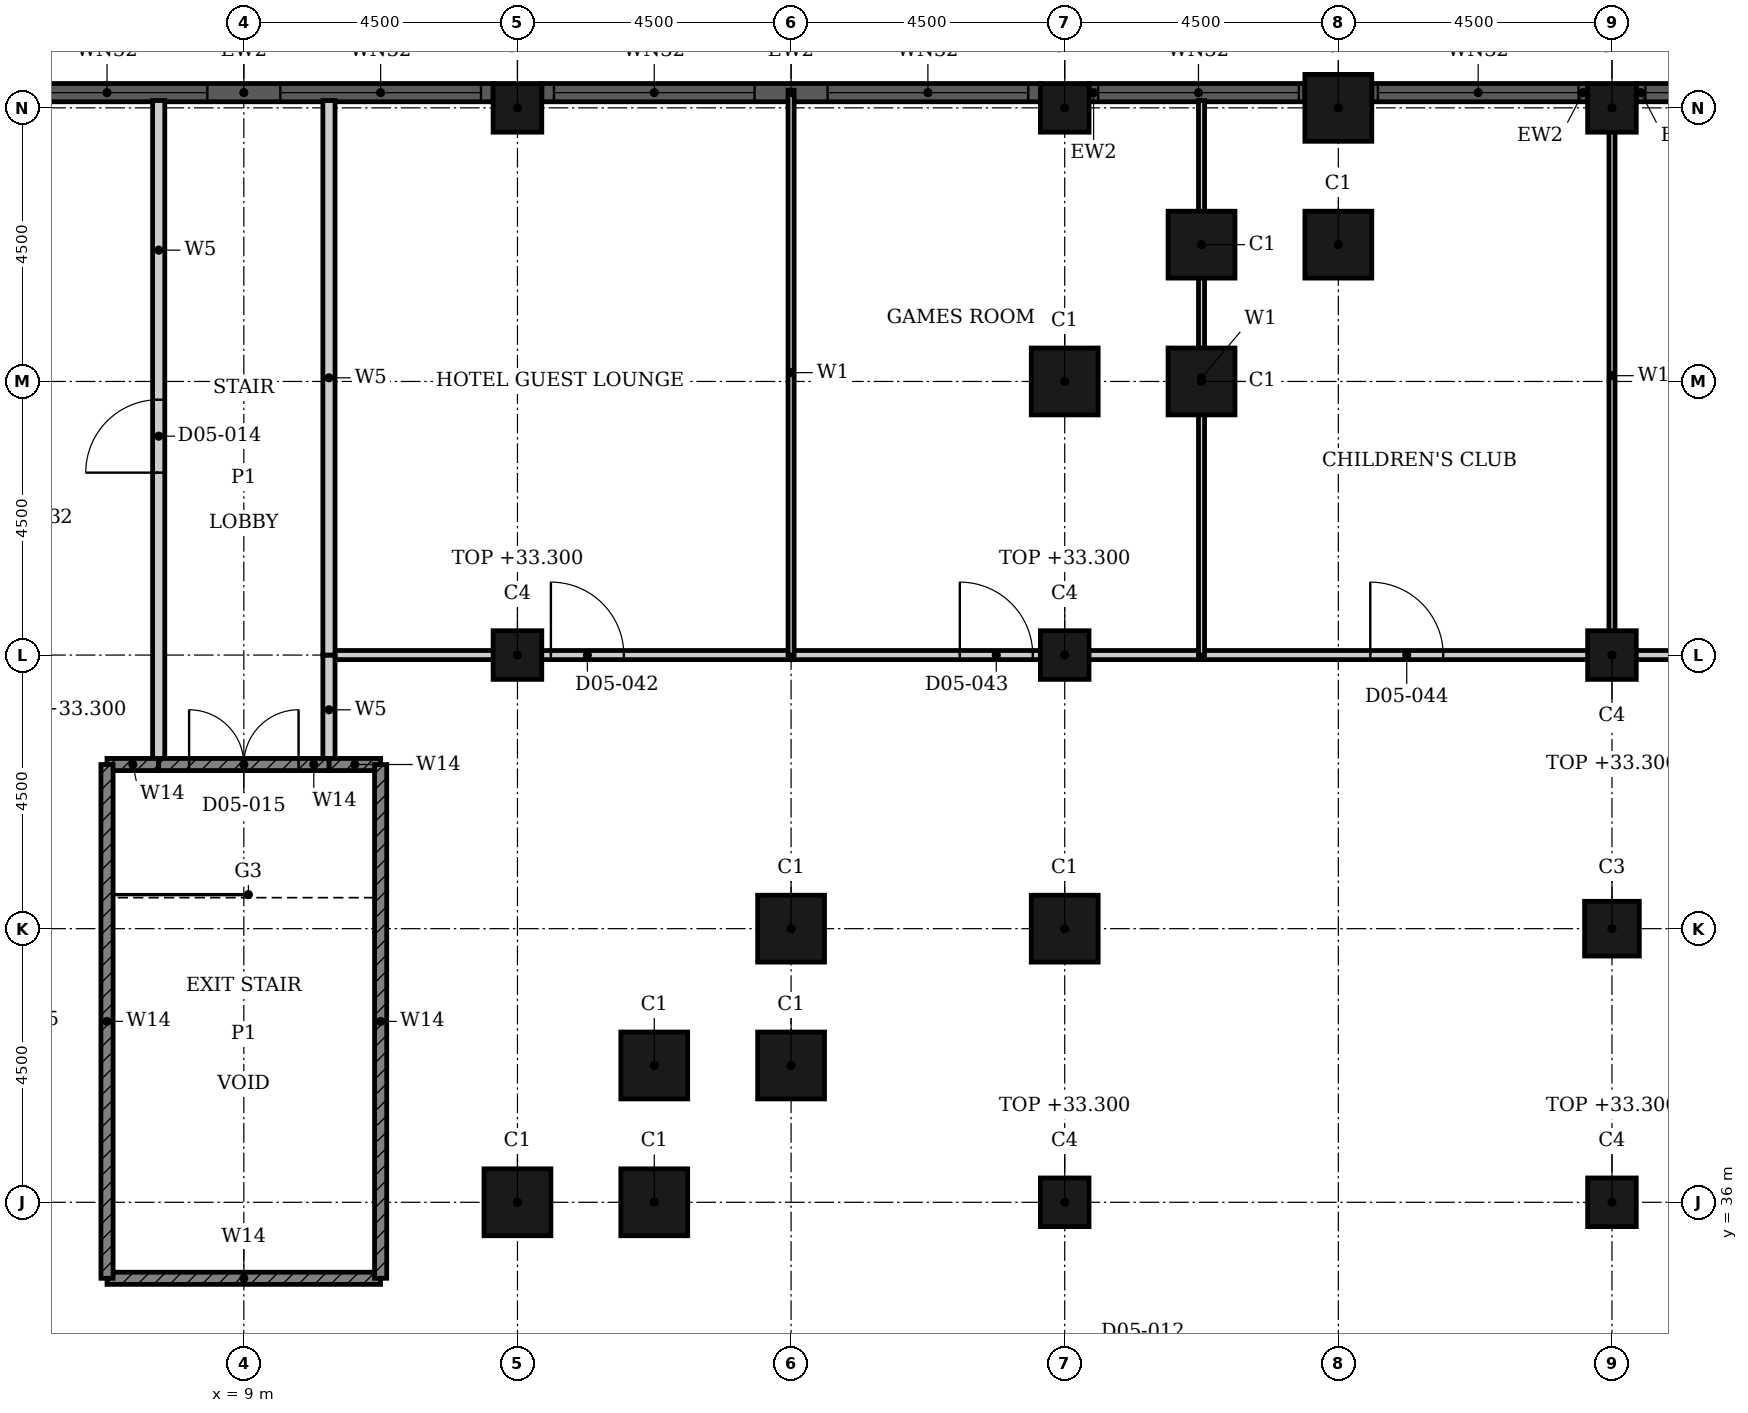
"""IFC4 building model, lengths in metres.
Left out: names, types, materials, properties, quantities, classifications, styles, units other than length and angle.
Written with IfcOpenShell. Run it as: python <this file> out.ifc"""

import sys

from ifc_helpers import new_model, si_unit, direction, frame, frame_2d, origin, origin_2d, place, context, subcontext, project, spatial, rectangle, hollow_rectangle, extrude, element, fill, save


model = new_model("IFC4")
c1 = context("Model", 3, precision=1e-05, world=origin(), true_north=direction((0.0, 1.0)))
c2 = subcontext(c1, "Body", "Model", "MODEL_VIEW")
j1 = project(units=[si_unit("LENGTHUNIT", "METRE"), si_unit("PLANEANGLEUNIT", "RADIAN")], contexts=[c1])
p1 = place(None, origin())
s1 = spatial("IfcSite", under=j1, at=p1, CompositionType="ELEMENT")
p2 = place(p1, origin())
s2 = spatial("IfcBuilding", under=s1, at=p2, CompositionType="ELEMENT")
p3 = place(p2, frame((0.0, 0.0, 28.8)))
s3 = spatial("IfcBuildingStorey", under=s2, at=p3, CompositionType="ELEMENT", Elevation=28.8)
for number, where, z_axis, x_axis in (
    (1, (27.0, 54.0, 0.0), (0.0, 0.0, 1.0), (1.0, 0.0, 0.0)),
    (2, (27.0, 51.75, 0.0), (0.0, 0.0, 1.0), (1.0, 0.0, 0.0)),
    (3, (24.75, 51.75, 0.0), (0.0, 0.0, 1.0), (1.0, 0.0, 0.0)),
    (4, (24.75, 49.5, 0.0), (0.0, 0.0, 1.0), (1.0, 0.0, 0.0)),
    (5, (22.5, 49.5, 0.0), (0.0, 0.0, 1.0), (1.0, 0.0, 0.0)),
    (6, (22.5, 40.5, 0.0), (0.0, 0.0, 1.0), (1.0, 0.0, 0.0)),
    (7, (18.0, 40.5, 0.0), (0.0, 0.0, 1.0), (1.0, 0.0, 0.0)),
    (8, (18.0, 38.25, 0.0), (0.0, 0.0, 1.0), (1.0, 0.0, 0.0)),
    (9, (15.75, 38.25, 0.0), (0.0, 0.0, 1.0), (1.0, 0.0, 0.0)),
    (10, (15.75, 36.0, 0.0), (0.0, 0.0, 1.0), (1.0, 0.0, 0.0)),
    (11, (13.5, 36.0, 0.0), (0.0, 0.0, 1.0), (1.0, 0.0, 0.0)),
):
    element("IfcColumn", number, at=place(p3, frame(where, z_axis=z_axis, x_axis=x_axis)), inside=s3, PredefinedType="COLUMN", context=c2, shape_type="SweptSolid", body=[
        extrude(hollow_rectangle(XDim=1.1, YDim=1.1, WallThickness=0.036, at=origin_2d()), origin(), (0.0, 0.0, 1.0), 4.8),
    ])
p4 = place(p3, frame((31.5, 40.5, 0.0), z_axis=(0.0, 0.0, 1.0), x_axis=(1.0, 0.0, 0.0)))
e12 = element("IfcColumn", 12, at=p4, inside=s3, PredefinedType="COLUMN", context=c2, shape_type="SweptSolid", body=[
    extrude(hollow_rectangle(XDim=0.9, YDim=0.9, WallThickness=0.028, at=origin_2d()), origin(), (0.0, 0.0, 1.0), 4.8),
])
for number, where, z_axis, x_axis in (
    (13, (13.5, 54.0, 0.0), (0.0, 0.0, 1.0), (1.0, 0.0, 0.0)),
    (14, (22.5, 54.0, 0.0), (0.0, 0.0, 1.0), (1.0, 0.0, 0.0)),
    (15, (31.5, 54.0, 0.0), (0.0, 0.0, 1.0), (1.0, 0.0, 0.0)),
    (16, (13.5, 45.0, 0.0), (0.0, 0.0, 1.0), (1.0, 0.0, 0.0)),
    (17, (22.5, 36.0, 0.0), (0.0, 0.0, 1.0), (1.0, 0.0, 0.0)),
    (18, (22.5, 45.0, 0.0), (0.0, 0.0, 1.0), (1.0, 0.0, 0.0)),
    (19, (31.5, 36.0, 0.0), (0.0, 0.0, 1.0), (1.0, 0.0, 0.0)),
    (20, (31.5, 45.0, 0.0), (0.0, 0.0, 1.0), (1.0, 0.0, 0.0)),
):
    element("IfcColumn", number, at=place(p3, frame(where, z_axis=z_axis, x_axis=x_axis)), inside=s3, PredefinedType="COLUMN", context=c2, shape_type="SweptSolid", body=[
        extrude(hollow_rectangle(XDim=0.8, YDim=0.8, WallThickness=0.025, at=origin_2d()), origin(), (0.0, 0.0, 1.0), 4.5),
    ])
p5 = place(p3, frame((35.45, 54.25, 0.0), z_axis=(0.0, 0.0, 1.0), x_axis=(-1.0, 0.0, 0.0)))
e21 = element("IfcWall", 21, at=p5, inside=s3, PredefinedType="SOLIDWALL", context=c2, shape_type="SweptSolid", body=[
    extrude(rectangle(XDim=3.55, YDim=0.3, at=frame_2d((1.775, 0.0))), origin(), (0.0, 0.0, 1.0), 4.8),
])
p6 = place(p5, frame((0.1, 0.0, 0.9)))
e22 = element("IfcOpeningElement", 22, at=p6, cuts=e21, PredefinedType="OPENING", context=c2, shape_type="SweptSolid", body=[
    extrude(rectangle(XDim=3.3, YDim=2.9, at=frame_2d((1.65, 1.45))), frame((0.0, 0.16, 0.0), z_axis=(0.0, -1.0, 0.0), x_axis=(1.0, 0.0, 0.0)), (0.0, 0.0, 1.0), 0.32),
])
p7 = place(p3, frame((31.1, 54.25, 0.0), z_axis=(0.0, 0.0, 1.0), x_axis=(-1.0, 0.0, 0.0)))
e23 = element("IfcWall", 23, at=p7, inside=s3, PredefinedType="SOLIDWALL", context=c2, shape_type="SweptSolid", body=[
    extrude(rectangle(XDim=3.55, YDim=0.3, at=frame_2d((1.775, 0.0))), origin(), (0.0, 0.0, 1.0), 4.8),
])
p8 = place(p7, frame((0.15, 0.0, 0.9)))
e24 = element("IfcOpeningElement", 24, at=p8, cuts=e23, PredefinedType="OPENING", context=c2, shape_type="SweptSolid", body=[
    extrude(rectangle(XDim=3.3, YDim=2.9, at=frame_2d((1.65, 1.45))), frame((0.0, 0.16, 0.0), z_axis=(0.0, -1.0, 0.0), x_axis=(1.0, 0.0, 0.0)), (0.0, 0.0, 1.0), 0.32),
])
p9 = place(p3, frame((26.45, 54.25, 0.0), z_axis=(0.0, 0.0, 1.0), x_axis=(-1.0, 0.0, 0.0)))
e25 = element("IfcWall", 25, at=p9, inside=s3, PredefinedType="SOLIDWALL", context=c2, shape_type="SweptSolid", body=[
    extrude(rectangle(XDim=3.55, YDim=0.3, at=frame_2d((1.775, 0.0))), origin(), (0.0, 0.0, 1.0), 4.8),
])
p10 = place(p9, frame((0.1, 0.0, 0.9)))
e26 = element("IfcOpeningElement", 26, at=p10, cuts=e25, PredefinedType="OPENING", context=c2, shape_type="SweptSolid", body=[
    extrude(rectangle(XDim=3.3, YDim=2.9, at=frame_2d((1.65, 1.45))), frame((0.0, 0.16, 0.0), z_axis=(0.0, -1.0, 0.0), x_axis=(1.0, 0.0, 0.0)), (0.0, 0.0, 1.0), 0.32),
])
p11 = place(p3, frame((22.1, 54.25, 0.0), z_axis=(0.0, 0.0, 1.0), x_axis=(-1.0, 0.0, 0.0)))
e27 = element("IfcWall", 27, at=p11, inside=s3, PredefinedType="SOLIDWALL", context=c2, shape_type="SweptSolid", body=[
    extrude(rectangle(XDim=8.2, YDim=0.3, at=frame_2d((4.1, 0.0))), origin(), (0.0, 0.0, 1.0), 4.8),
])
p12 = place(p11, frame((0.2, 0.0, 0.9)))
e28 = element("IfcOpeningElement", 28, at=p12, cuts=e27, PredefinedType="OPENING", context=c2, shape_type="SweptSolid", body=[
    extrude(rectangle(XDim=3.3, YDim=2.9, at=frame_2d((1.65, 1.45))), frame((0.0, 0.16, 0.0), z_axis=(0.0, -1.0, 0.0), x_axis=(1.0, 0.0, 0.0)), (0.0, 0.0, 1.0), 0.32),
])
p13 = place(p11, frame((4.7, 0.0, 0.9)))
e29 = element("IfcOpeningElement", 29, at=p13, cuts=e27, PredefinedType="OPENING", context=c2, shape_type="SweptSolid", body=[
    extrude(rectangle(XDim=3.3, YDim=2.9, at=frame_2d((1.65, 1.45))), frame((0.0, 0.16, 0.0), z_axis=(0.0, -1.0, 0.0), x_axis=(1.0, 0.0, 0.0)), (0.0, 0.0, 1.0), 0.32),
])
p14 = place(p3, frame((13.1, 54.25, 0.0), z_axis=(0.0, 0.0, 1.0), x_axis=(-1.0, 0.0, 0.0)))
e30 = element("IfcWall", 30, at=p14, inside=s3, PredefinedType="SOLIDWALL", context=c2, shape_type="SweptSolid", body=[
    extrude(rectangle(XDim=8.2, YDim=0.3, at=frame_2d((4.1, 0.0))), origin(), (0.0, 0.0, 1.0), 4.8),
])
p15 = place(p14, frame((0.2, 0.0, 0.9)))
e31 = element("IfcOpeningElement", 31, at=p15, cuts=e30, PredefinedType="OPENING", context=c2, shape_type="SweptSolid", body=[
    extrude(rectangle(XDim=3.3, YDim=2.9, at=frame_2d((1.65, 1.45))), frame((0.0, 0.16, 0.0), z_axis=(0.0, -1.0, 0.0), x_axis=(1.0, 0.0, 0.0)), (0.0, 0.0, 1.0), 0.32),
])
p16 = place(p14, frame((4.7, 0.0, 0.9)))
e32 = element("IfcOpeningElement", 32, at=p16, cuts=e30, PredefinedType="OPENING", context=c2, shape_type="SweptSolid", body=[
    extrude(rectangle(XDim=3.3, YDim=2.9, at=frame_2d((1.65, 1.45))), frame((0.0, 0.16, 0.0), z_axis=(0.0, -1.0, 0.0), x_axis=(1.0, 0.0, 0.0)), (0.0, 0.0, 1.0), 0.32),
])
p17 = place(p3, frame((10.4, 45.0, 0.0), z_axis=(0.0, 0.0, 1.0), x_axis=(1.0, 0.0, 0.0)))
e33 = element("IfcWall", 33, at=p17, inside=s3, PredefinedType="PARTITIONING", context=c2, shape_type="SweptSolid", body=[
    extrude(rectangle(XDim=7.6, YDim=0.15, at=frame_2d((3.8, 0.0))), origin(), (0.0, 0.0, 1.0), 4.5),
])
p18 = place(p17, frame((3.65, 0.0, 0.0)))
e34 = element("IfcOpeningElement", 34, at=p18, cuts=e33, PredefinedType="OPENING", context=c2, shape_type="SweptSolid", body=[
    extrude(rectangle(XDim=1.2, YDim=2.4, at=frame_2d((0.6, 1.2))), frame((0.0, 0.085, 0.0), z_axis=(0.0, -1.0, 0.0), x_axis=(1.0, 0.0, 0.0)), (0.0, 0.0, 1.0), 0.17),
])
p19 = place(p3, frame((18.0, 45.0, 0.0), z_axis=(0.0, 0.0, 1.0), x_axis=(1.0, 0.0, 0.0)))
e35 = element("IfcWall", 35, at=p19, inside=s3, PredefinedType="PARTITIONING", context=c2, shape_type="SweptSolid", body=[
    extrude(rectangle(XDim=6.75, YDim=0.15, at=frame_2d((3.375, 0.0))), origin(), (0.0, 0.0, 1.0), 4.5),
])
p20 = place(p19, frame((2.775, 0.0, 0.0)))
e36 = element("IfcOpeningElement", 36, at=p20, cuts=e35, PredefinedType="OPENING", context=c2, shape_type="SweptSolid", body=[
    extrude(rectangle(XDim=1.2, YDim=2.4, at=frame_2d((0.6, 1.2))), frame((0.0, 0.085, 0.0), z_axis=(0.0, -1.0, 0.0), x_axis=(1.0, 0.0, 0.0)), (0.0, 0.0, 1.0), 0.17),
])
p21 = place(p3, frame((24.75, 45.0, 0.0), z_axis=(0.0, 0.0, 1.0), x_axis=(1.0, 0.0, 0.0)))
e37 = element("IfcWall", 37, at=p21, inside=s3, PredefinedType="PARTITIONING", context=c2, shape_type="SweptSolid", body=[
    extrude(rectangle(XDim=6.75, YDim=0.15, at=frame_2d((3.375, 0.0))), origin(), (0.0, 0.0, 1.0), 4.5),
])
p22 = place(p21, frame((2.775, 0.0, 0.0)))
e38 = element("IfcOpeningElement", 38, at=p22, cuts=e37, PredefinedType="OPENING", context=c2, shape_type="SweptSolid", body=[
    extrude(rectangle(XDim=1.2, YDim=2.4, at=frame_2d((0.6, 1.2))), frame((0.0, 0.085, 0.0), z_axis=(0.0, -1.0, 0.0), x_axis=(1.0, 0.0, 0.0)), (0.0, 0.0, 1.0), 0.17),
])
p23 = place(p3, frame((31.5, 45.0, 0.0), z_axis=(0.0, 0.0, 1.0), x_axis=(1.0, 0.0, 0.0)))
e39 = element("IfcWall", 39, at=p23, inside=s3, PredefinedType="PARTITIONING", context=c2, shape_type="SweptSolid", body=[
    extrude(rectangle(XDim=10.0, YDim=0.15, at=frame_2d((5.0, 0.0))), origin(), (0.0, 0.0, 1.0), 4.5),
])
p24 = place(p23, frame((4.55, 0.0, 0.0)))
e40 = element("IfcOpeningElement", 40, at=p24, cuts=e39, PredefinedType="OPENING", context=c2, shape_type="SweptSolid", body=[
    extrude(rectangle(XDim=0.9, YDim=2.1, at=frame_2d((0.45, 1.05))), frame((0.0, 0.085, 0.0), z_axis=(0.0, -1.0, 0.0), x_axis=(1.0, 0.0, 0.0)), (0.0, 0.0, 1.0), 0.17),
])
p25 = place(p3, frame((18.0, 45.0, 0.0), z_axis=(0.0, 0.0, 1.0), x_axis=(0.0, 1.0, 0.0)))
e41 = element("IfcWall", 41, at=p25, inside=s3, PredefinedType="PARTITIONING", context=c2, shape_type="SweptSolid", body=[
    extrude(rectangle(XDim=9.29, YDim=0.1, at=frame_2d((4.645, 0.0))), origin(), (0.0, 0.0, 1.0), 4.5),
])
p26 = place(p3, frame((24.75, 45.0, 0.0), z_axis=(0.0, 0.0, 1.0), x_axis=(0.0, 1.0, 0.0)))
e42 = element("IfcWall", 42, at=p26, inside=s3, PredefinedType="PARTITIONING", context=c2, shape_type="SweptSolid", body=[
    extrude(rectangle(XDim=9.12, YDim=0.1, at=frame_2d((4.56, 0.0))), origin(), (0.0, 0.0, 1.0), 3.88),
])
p27 = place(p3, frame((31.5, 45.0, 0.0), z_axis=(0.0, 0.0, 1.0), x_axis=(0.0, 1.0, 0.0)))
e43 = element("IfcWall", 43, at=p27, inside=s3, PredefinedType="PARTITIONING", context=c2, shape_type="SweptSolid", body=[
    extrude(rectangle(XDim=9.19, YDim=0.1, at=frame_2d((4.595, 0.0))), origin(), (0.0, 0.0, 1.0), 3.78),
])
p28 = place(p3, frame((10.4, 43.2, 0.0), z_axis=(0.0, 0.0, 1.0), x_axis=(0.0, 1.0, 0.0)))
e44 = element("IfcWall", 44, at=p28, inside=s3, PredefinedType="PARTITIONING", context=c2, shape_type="SweptSolid", body=[
    extrude(rectangle(XDim=1.8, YDim=0.2, at=frame_2d((0.9, 0.0))), origin(), (0.0, 0.0, 1.0), 4.5),
])
p29 = place(p3, frame((10.4, 45.0, 0.0), z_axis=(0.0, 0.0, 1.0), x_axis=(0.0, 1.0, 0.0)))
e45 = element("IfcWall", 45, at=p29, inside=s3, PredefinedType="PARTITIONING", context=c2, shape_type="SweptSolid", body=[
    extrude(rectangle(XDim=9.12, YDim=0.2, at=frame_2d((4.56, 0.0))), origin(), (0.0, 0.0, 1.0), 4.5),
])
p30 = place(p3, frame((7.6, 43.2, 0.0), z_axis=(0.0, 0.0, 1.0), x_axis=(0.0, 1.0, 0.0)))
e46 = element("IfcWall", 46, at=p30, inside=s3, PredefinedType="PARTITIONING", context=c2, shape_type="SweptSolid", body=[
    extrude(rectangle(XDim=10.92, YDim=0.2, at=frame_2d((5.46, 0.0))), origin(), (0.0, 0.0, 1.0), 4.5),
])
p31 = place(p30, frame((4.8, 0.0, 0.0)))
e47 = element("IfcOpeningElement", 47, at=p31, cuts=e46, PredefinedType="OPENING", context=c2, shape_type="SweptSolid", body=[
    extrude(rectangle(XDim=1.2, YDim=2.1, at=frame_2d((0.6, 1.05))), frame((0.0, 0.11, 0.0), z_axis=(0.0, -1.0, 0.0), x_axis=(1.0, 0.0, 0.0)), (0.0, 0.0, 1.0), 0.22),
])
p32 = place(p3, frame((6.75, 34.75, 0.0), z_axis=(0.0, 0.0, 1.0), x_axis=(1.0, 0.0, 0.0)))
e48 = element("IfcWall", 48, at=p32, inside=s3, PredefinedType="SHEAR", context=c2, shape_type="SweptSolid", body=[
    extrude(rectangle(XDim=4.5, YDim=0.2, at=frame_2d((2.25, 0.0))), origin(), (0.0, 0.0, 1.0), 4.5),
])
for number, where, z_axis, x_axis in (
    (49, (6.75, 43.2, 0.0), (0.0, 0.0, 1.0), (1.0, 0.0, 0.0)),
    (50, (10.4, 43.2, 0.0), (0.0, 0.0, 1.0), (1.0, 0.0, 0.0)),
):
    element("IfcWall", number, at=place(p3, frame(where, z_axis=z_axis, x_axis=x_axis)), inside=s3, PredefinedType="SHEAR", context=c2, shape_type="SweptSolid", body=[
        extrude(rectangle(XDim=0.85, YDim=0.2, at=frame_2d((0.425, 0.0))), origin(), (0.0, 0.0, 1.0), 4.5),
    ])
p33 = place(p3, frame((7.6, 43.2, 0.0), z_axis=(0.0, 0.0, 1.0), x_axis=(1.0, 0.0, 0.0)))
e51 = element("IfcWall", 51, at=p33, inside=s3, PredefinedType="SHEAR", context=c2, shape_type="SweptSolid", body=[
    extrude(rectangle(XDim=2.8, YDim=0.2, at=frame_2d((1.4, 0.0))), origin(), (0.0, 0.0, 1.0), 4.5),
])
p34 = place(p33, frame((0.5, 0.0, 0.0)))
e52 = element("IfcOpeningElement", 52, at=p34, cuts=e51, PredefinedType="OPENING", context=c2, shape_type="SweptSolid", body=[
    extrude(rectangle(XDim=1.8, YDim=2.1, at=frame_2d((0.9, 1.05))), frame((0.0, 0.11, 0.0), z_axis=(0.0, -1.0, 0.0), x_axis=(1.0, 0.0, 0.0)), (0.0, 0.0, 1.0), 0.22),
])
for number, where, z_axis, x_axis in (
    (53, (11.25, 34.75, 0.0), (0.0, 0.0, 1.0), (0.0, 1.0, 0.0)),
    (54, (6.75, 34.75, 0.0), (0.0, 0.0, 1.0), (0.0, 1.0, 0.0)),
):
    element("IfcWall", number, at=place(p3, frame(where, z_axis=z_axis, x_axis=x_axis)), inside=s3, PredefinedType="SHEAR", context=c2, shape_type="SweptSolid", body=[
        extrude(rectangle(XDim=8.45, YDim=0.2, at=frame_2d((4.225, 0.0))), origin(), (0.0, 0.0, 1.0), 4.5),
    ])
p35 = place(p6, origin())
e55 = element("IfcWindow", 55, at=p35, inside=s3, PartitioningType="SINGLE_PANEL", PredefinedType="WINDOW", context=c2, shape_type="SweptSolid", body=[
    extrude(rectangle(XDim=3.3, YDim=2.9, at=frame_2d((1.65, 1.45))), frame((0.0, 0.03, 0.0), z_axis=(0.0, -1.0, 0.0), x_axis=(1.0, 0.0, 0.0)), (0.0, 0.0, 1.0), 0.06),
])
fill(e22, e55)
p36 = place(p8, origin())
e56 = element("IfcWindow", 56, at=p36, inside=s3, PartitioningType="SINGLE_PANEL", PredefinedType="WINDOW", context=c2, shape_type="SweptSolid", body=[
    extrude(rectangle(XDim=3.3, YDim=2.9, at=frame_2d((1.65, 1.45))), frame((0.0, 0.03, 0.0), z_axis=(0.0, -1.0, 0.0), x_axis=(1.0, 0.0, 0.0)), (0.0, 0.0, 1.0), 0.06),
])
fill(e24, e56)
p37 = place(p10, origin())
e57 = element("IfcWindow", 57, at=p37, inside=s3, PartitioningType="SINGLE_PANEL", PredefinedType="WINDOW", context=c2, shape_type="SweptSolid", body=[
    extrude(rectangle(XDim=3.3, YDim=2.9, at=frame_2d((1.65, 1.45))), frame((0.0, 0.03, 0.0), z_axis=(0.0, -1.0, 0.0), x_axis=(1.0, 0.0, 0.0)), (0.0, 0.0, 1.0), 0.06),
])
fill(e26, e57)
p38 = place(p12, origin())
e58 = element("IfcWindow", 58, at=p38, inside=s3, PartitioningType="SINGLE_PANEL", PredefinedType="WINDOW", context=c2, shape_type="SweptSolid", body=[
    extrude(rectangle(XDim=3.3, YDim=2.9, at=frame_2d((1.65, 1.45))), frame((0.0, 0.03, 0.0), z_axis=(0.0, -1.0, 0.0), x_axis=(1.0, 0.0, 0.0)), (0.0, 0.0, 1.0), 0.06),
])
fill(e28, e58)
p39 = place(p13, origin())
e59 = element("IfcWindow", 59, at=p39, inside=s3, PartitioningType="SINGLE_PANEL", PredefinedType="WINDOW", context=c2, shape_type="SweptSolid", body=[
    extrude(rectangle(XDim=3.3, YDim=2.9, at=frame_2d((1.65, 1.45))), frame((0.0, 0.03, 0.0), z_axis=(0.0, -1.0, 0.0), x_axis=(1.0, 0.0, 0.0)), (0.0, 0.0, 1.0), 0.06),
])
fill(e29, e59)
p40 = place(p15, origin())
e60 = element("IfcWindow", 60, at=p40, inside=s3, PartitioningType="SINGLE_PANEL", PredefinedType="WINDOW", context=c2, shape_type="SweptSolid", body=[
    extrude(rectangle(XDim=3.3, YDim=2.9, at=frame_2d((1.65, 1.45))), frame((0.0, 0.03, 0.0), z_axis=(0.0, -1.0, 0.0), x_axis=(1.0, 0.0, 0.0)), (0.0, 0.0, 1.0), 0.06),
])
fill(e31, e60)
p41 = place(p16, origin())
e61 = element("IfcWindow", 61, at=p41, inside=s3, PartitioningType="SINGLE_PANEL", PredefinedType="WINDOW", context=c2, shape_type="SweptSolid", body=[
    extrude(rectangle(XDim=3.3, YDim=2.9, at=frame_2d((1.65, 1.45))), frame((0.0, 0.03, 0.0), z_axis=(0.0, -1.0, 0.0), x_axis=(1.0, 0.0, 0.0)), (0.0, 0.0, 1.0), 0.06),
])
fill(e32, e61)
p42 = place(p31, origin())
e62 = element("IfcDoor", 62, at=p42, inside=s3, OperationType="SINGLE_SWING_RIGHT", PredefinedType="DOOR", context=c2, shape_type="SweptSolid", body=[
    extrude(rectangle(XDim=1.2, YDim=2.1, at=frame_2d((0.6, 1.05))), frame((0.0, 0.025, 0.0), z_axis=(0.0, -1.0, 0.0), x_axis=(1.0, 0.0, 0.0)), (0.0, 0.0, 1.0), 0.05),
])
fill(e47, e62)
p43 = place(p34, origin())
e63 = element("IfcDoor", 63, at=p43, inside=s3, OperationType="DOUBLE_DOOR_SINGLE_SWING", PredefinedType="DOOR", context=c2, shape_type="SweptSolid", body=[
    extrude(rectangle(XDim=1.8, YDim=2.1, at=frame_2d((0.9, 1.05))), frame((0.0, 0.025, 0.0), z_axis=(0.0, -1.0, 0.0), x_axis=(1.0, 0.0, 0.0)), (0.0, 0.0, 1.0), 0.05),
])
fill(e52, e63)
p44 = place(p18, origin())
e64 = element("IfcDoor", 64, at=p44, inside=s3, OperationType="SINGLE_SWING_RIGHT", PredefinedType="DOOR", context=c2, shape_type="SweptSolid", body=[
    extrude(rectangle(XDim=1.2, YDim=2.4, at=frame_2d((0.6, 1.2))), frame((0.0, 0.025, 0.0), z_axis=(0.0, -1.0, 0.0), x_axis=(1.0, 0.0, 0.0)), (0.0, 0.0, 1.0), 0.05),
])
fill(e34, e64)
p45 = place(p20, origin())
e65 = element("IfcDoor", 65, at=p45, inside=s3, OperationType="SINGLE_SWING_LEFT", PredefinedType="DOOR", context=c2, shape_type="SweptSolid", body=[
    extrude(rectangle(XDim=1.2, YDim=2.4, at=frame_2d((0.6, 1.2))), frame((0.0, 0.025, 0.0), z_axis=(0.0, -1.0, 0.0), x_axis=(1.0, 0.0, 0.0)), (0.0, 0.0, 1.0), 0.05),
])
fill(e36, e65)
p46 = place(p22, origin())
e66 = element("IfcDoor", 66, at=p46, inside=s3, OperationType="SINGLE_SWING_LEFT", PredefinedType="DOOR", context=c2, shape_type="SweptSolid", body=[
    extrude(rectangle(XDim=1.2, YDim=2.4, at=frame_2d((0.6, 1.2))), frame((0.0, 0.025, 0.0), z_axis=(0.0, -1.0, 0.0), x_axis=(1.0, 0.0, 0.0)), (0.0, 0.0, 1.0), 0.05),
])
fill(e38, e66)
save(model, sys.argv[1])
